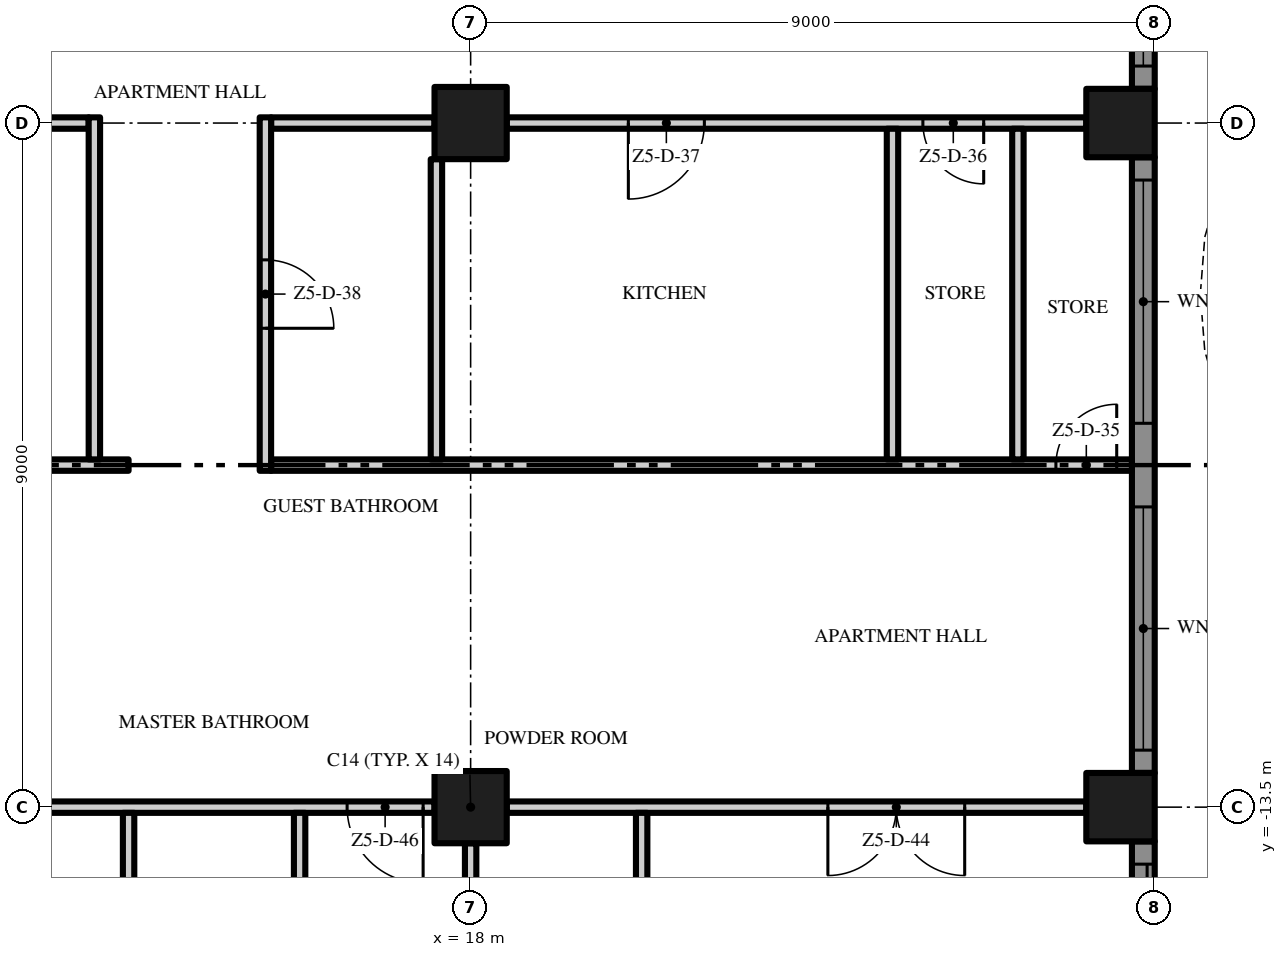
"""IFC4 building model, lengths in metres.
Left out: names, types, materials, properties, quantities, classifications, styles, units other than length and angle.
Written with IfcOpenShell. Run it as: python <this file> out.ifc"""

import sys

from ifc_helpers import new_model, si_unit, direction, frame, frame_2d, origin, origin_2d, place, context, subcontext, project, spatial, polyline, rectangle, outline, extrude, element, fill, save


model = new_model("IFC4")
c1 = context("Model", 3, precision=1e-05, world=origin(), true_north=direction((0.0, 1.0)))
c2 = subcontext(c1, "Body", "Model", "MODEL_VIEW")
j1 = project(units=[si_unit("LENGTHUNIT", "METRE"), si_unit("PLANEANGLEUNIT", "RADIAN")], contexts=[c1])
p1 = place(None, origin())
s1 = spatial("IfcSite", under=j1, at=p1, CompositionType="ELEMENT")
p2 = place(p1, origin())
s2 = spatial("IfcBuilding", under=s1, at=p2, CompositionType="ELEMENT")
p3 = place(p2, frame((0.0, 0.0, 273.0)))
s3 = spatial("IfcBuildingStorey", under=s2, at=p3, CompositionType="ELEMENT", Elevation=273.0)
for number, where, z_axis, x_axis in (
    (1, (18.0, -13.5, 0.0), (0.0, 0.0, 1.0), (1.0, 0.0, 0.0)),
    (2, (18.0, -4.5, 0.0), (0.0, 0.0, 1.0), (1.0, 0.0, 0.0)),
):
    element("IfcColumn", number, at=place(p3, frame(where, z_axis=z_axis, x_axis=x_axis)), inside=s3, PredefinedType="COLUMN", context=c2, shape_type="SweptSolid", body=[
        extrude(rectangle(XDim=0.95, YDim=0.95, at=origin_2d()), origin(), (0.0, 0.0, 1.0), 3.5),
    ])
for number, where, z_axis, x_axis in (
    (3, (26.55, -13.5, 0.0), (0.0, 0.0, 1.0), (1.0, 0.0, 0.0)),
    (4, (26.55, -4.5, 0.0), (0.0, 0.0, 1.0), (1.0, 0.0, 0.0)),
):
    element("IfcColumn", number, at=place(p3, frame(where, z_axis=z_axis, x_axis=x_axis)), inside=s3, PredefinedType="COLUMN", context=c2, shape_type="SweptSolid", body=[
        extrude(rectangle(XDim=0.9, YDim=0.9, at=origin_2d()), origin(), (0.0, 0.0, 1.0), 3.5),
    ])
p4 = place(p3, frame((26.85, -13.95, 0.0), z_axis=(0.0, 0.0, 1.0), x_axis=(0.0, -1.0, 0.0)))
e5 = element("IfcWall", 5, at=p4, inside=s3, PredefinedType="SOLIDWALL", context=c2, shape_type="SweptSolid", body=[
    extrude(rectangle(XDim=3.75, YDim=0.3, at=frame_2d((1.875, 0.0))), origin(), (0.0, 0.0, 1.0), 3.5),
])
p5 = place(p4, frame((0.3, 0.0, 0.0)))
e6 = element("IfcOpeningElement", 6, at=p5, cuts=e5, PredefinedType="OPENING", context=c2, shape_type="SweptSolid", body=[
    extrude(rectangle(XDim=3.15, YDim=2.4, at=frame_2d((1.575, 1.2))), frame((0.0, 0.16, 0.0), z_axis=(0.0, -1.0, 0.0), x_axis=(1.0, 0.0, 0.0)), (0.0, 0.0, 1.0), 0.32),
])
p6 = place(p3, frame((26.85, -4.95, 0.0), z_axis=(0.0, 0.0, 1.0), x_axis=(0.0, -1.0, 0.0)))
e7 = element("IfcWall", 7, at=p6, inside=s3, PredefinedType="SOLIDWALL", context=c2, shape_type="SweptSolid", body=[
    extrude(rectangle(XDim=8.1, YDim=0.3, at=frame_2d((4.05, 0.0))), origin(), (0.0, 0.0, 1.0), 3.5),
])
p7 = place(p6, frame((4.6, 0.0, 0.45)))
e8 = element("IfcOpeningElement", 8, at=p7, cuts=e7, PredefinedType="OPENING", context=c2, shape_type="SweptSolid", body=[
    extrude(rectangle(XDim=3.2, YDim=2.65, at=frame_2d((1.6, 1.325))), frame((0.0, 0.16, 0.0), z_axis=(0.0, -1.0, 0.0), x_axis=(1.0, 0.0, 0.0)), (0.0, 0.0, 1.0), 0.32),
])
p8 = place(p6, frame((0.3, 0.0, 0.45)))
e9 = element("IfcOpeningElement", 9, at=p8, cuts=e7, PredefinedType="OPENING", context=c2, shape_type="SweptSolid", body=[
    extrude(rectangle(XDim=3.2, YDim=2.65, at=frame_2d((1.6, 1.325))), frame((0.0, 0.16, 0.0), z_axis=(0.0, -1.0, 0.0), x_axis=(1.0, 0.0, 0.0)), (0.0, 0.0, 1.0), 0.32),
])
p9 = place(p3, frame((26.85, 4.05, 0.0), z_axis=(0.0, 0.0, 1.0), x_axis=(0.0, -1.0, 0.0)))
e10 = element("IfcWall", 10, at=p9, inside=s3, PredefinedType="SOLIDWALL", context=c2, shape_type="SweptSolid", body=[
    extrude(rectangle(XDim=8.1, YDim=0.3, at=frame_2d((4.05, 0.0))), origin(), (0.0, 0.0, 1.0), 3.5),
])
p10 = place(p9, frame((4.6, 0.0, 0.45)))
e11 = element("IfcOpeningElement", 11, at=p10, cuts=e10, PredefinedType="OPENING", context=c2, shape_type="SweptSolid", body=[
    extrude(rectangle(XDim=3.2, YDim=2.65, at=frame_2d((1.6, 1.325))), frame((0.0, 0.16, 0.0), z_axis=(0.0, -1.0, 0.0), x_axis=(1.0, 0.0, 0.0)), (0.0, 0.0, 1.0), 0.32),
])
p11 = place(p9, frame((0.3, 0.0, 0.0)))
e12 = element("IfcOpeningElement", 12, at=p11, cuts=e10, PredefinedType="OPENING", context=c2, shape_type="SweptSolid", body=[
    extrude(rectangle(XDim=3.2, YDim=2.4, at=frame_2d((1.6, 1.2))), frame((0.0, 0.16, 0.0), z_axis=(0.0, -1.0, 0.0), x_axis=(1.0, 0.0, 0.0)), (0.0, 0.0, 1.0), 0.32),
])
p12 = place(p3, origin())
e13 = element("IfcWall", 13, at=p12, inside=s3, PredefinedType="USERDEFINED", context=c2, shape_type="SweptSolid", body=[
    extrude(outline(polyline([(28.8, -18.0), (29.505, -16.5), (29.941, -15.0), (30.0, -14.25), (29.941, -13.5), (29.505, -12.0), (28.8, -10.5), (28.095, -9.0), (27.659, -7.5), (27.6, -6.75), (27.659, -6.0), (28.095, -4.5), (28.8, -3.0), (29.505, -1.5), (29.941, 0.0), (30.0, 0.75), (29.941, 1.5), (29.505, 3.0), (28.8, 4.5), (28.095, 6.0), (27.659, 7.5), (27.6, 8.25), (27.659, 9.0), (28.095, 10.5), (28.8, 12.0), (29.505, 13.5), (29.941, 15.0), (30.0, 15.75), (29.941, 16.5), (29.505, 18.0), (29.265, 17.93), (29.694, 16.455), (29.749, 15.75), (29.694, 15.045), (29.271, 13.589), (28.574, 12.106), (27.86, 10.589), (27.411, 9.045), (27.349, 8.25), (27.411, 7.455), (27.86, 5.911), (28.574, 4.394), (29.271, 2.911), (29.694, 1.455), (29.749, 0.75), (29.694, 0.045), (29.271, -1.411), (28.574, -2.894), (27.86, -4.411), (27.411, -5.955), (27.349, -6.75), (27.411, -7.545), (27.86, -9.089), (28.574, -10.606), (29.271, -12.089), (29.694, -13.545), (29.749, -14.25), (29.694, -14.955), (29.271, -16.411), (28.574, -17.894), (28.8, -18.0)])), origin(), (0.0, 0.0, 1.0), 0.9),
])
p13 = place(p3, frame((17.525, -13.5, 0.0), z_axis=(0.0, 0.0, 1.0), x_axis=(-1.0, 0.0, 0.0)))
e14 = element("IfcWall", 14, at=p13, inside=s3, PredefinedType="PARTITIONING", context=c2, shape_type="SweptSolid", body=[
    extrude(rectangle(XDim=8.05, YDim=0.15, at=frame_2d((4.025, 0.0))), origin(), (0.0, 0.0, 1.0), 3.5),
])
p14 = place(p13, frame((0.15, 0.0, 0.0)))
e15 = element("IfcOpeningElement", 15, at=p14, cuts=e14, PredefinedType="OPENING", context=c2, shape_type="SweptSolid", body=[
    extrude(rectangle(XDim=1.0, YDim=2.4, at=frame_2d((0.5, 1.2))), frame((0.0, 0.085, 0.0), z_axis=(0.0, -1.0, 0.0), x_axis=(1.0, 0.0, 0.0)), (0.0, 0.0, 1.0), 0.17),
])
p15 = place(p13, frame((6.9, 0.0, 0.0)))
e16 = element("IfcOpeningElement", 16, at=p15, cuts=e14, PredefinedType="OPENING", context=c2, shape_type="SweptSolid", body=[
    extrude(rectangle(XDim=1.0, YDim=2.4, at=frame_2d((0.5, 1.2))), frame((0.0, 0.085, 0.0), z_axis=(0.0, -1.0, 0.0), x_axis=(1.0, 0.0, 0.0)), (0.0, 0.0, 1.0), 0.17),
])
p16 = place(p3, frame((26.1, -13.5, 0.0), z_axis=(0.0, 0.0, 1.0), x_axis=(-1.0, 0.0, 0.0)))
e17 = element("IfcWall", 17, at=p16, inside=s3, PredefinedType="PARTITIONING", context=c2, shape_type="SweptSolid", body=[
    extrude(rectangle(XDim=7.625, YDim=0.15, at=frame_2d((3.812, 0.0))), origin(), (0.0, 0.0, 1.0), 3.5),
])
p17 = place(p16, frame((1.6, 0.0, 0.0)))
e18 = element("IfcOpeningElement", 18, at=p17, cuts=e17, PredefinedType="OPENING", context=c2, shape_type="SweptSolid", body=[
    extrude(rectangle(XDim=1.8, YDim=2.4, at=frame_2d((0.9, 1.2))), frame((0.0, 0.085, 0.0), z_axis=(0.0, -1.0, 0.0), x_axis=(1.0, 0.0, 0.0)), (0.0, 0.0, 1.0), 0.17),
])
p18 = place(p3, frame((0.1, -9.0, 0.0), z_axis=(0.0, 0.0, 1.0), x_axis=(1.0, 0.0, 0.0)))
e19 = element("IfcWall", 19, at=p18, inside=s3, PredefinedType="PARTITIONING", context=c2, shape_type="SweptSolid", body=[
    extrude(rectangle(XDim=13.4, YDim=0.15, at=frame_2d((6.7, 0.0))), origin(), (0.0, 0.0, 1.0), 3.5),
])
p19 = place(p18, frame((11.2, 0.0, 0.0)))
e20 = element("IfcOpeningElement", 20, at=p19, cuts=e19, PredefinedType="OPENING", context=c2, shape_type="SweptSolid", body=[
    extrude(rectangle(XDim=0.8, YDim=2.0, at=frame_2d((0.4, 1.0))), frame((0.0, 0.085, 0.0), z_axis=(0.0, -1.0, 0.0), x_axis=(1.0, 0.0, 0.0)), (0.0, 0.0, 1.0), 0.17),
])
p20 = place(p18, frame((8.55, 0.0, 0.0)))
e21 = element("IfcOpeningElement", 21, at=p20, cuts=e19, PredefinedType="OPENING", context=c2, shape_type="SweptSolid", body=[
    extrude(rectangle(XDim=0.8, YDim=2.0, at=frame_2d((0.4, 1.0))), frame((0.0, 0.085, 0.0), z_axis=(0.0, -1.0, 0.0), x_axis=(1.0, 0.0, 0.0)), (0.0, 0.0, 1.0), 0.17),
])
p21 = place(p18, frame((5.8, 0.0, 0.0)))
e22 = element("IfcOpeningElement", 22, at=p21, cuts=e19, PredefinedType="OPENING", context=c2, shape_type="SweptSolid", body=[
    extrude(rectangle(XDim=0.8, YDim=2.0, at=frame_2d((0.4, 1.0))), frame((0.0, 0.085, 0.0), z_axis=(0.0, -1.0, 0.0), x_axis=(1.0, 0.0, 0.0)), (0.0, 0.0, 1.0), 0.17),
])
p22 = place(p3, frame((15.375, -9.0, 0.0), z_axis=(0.0, 0.0, 1.0), x_axis=(1.0, 0.0, 0.0)))
e23 = element("IfcWall", 23, at=p22, inside=s3, PredefinedType="PARTITIONING", context=c2, shape_type="SweptSolid", body=[
    extrude(rectangle(XDim=11.325, YDim=0.15, at=frame_2d((5.662, 0.0))), origin(), (0.0, 0.0, 1.0), 3.5),
])
p23 = place(p22, frame((10.325, 0.0, 0.0)))
e24 = element("IfcOpeningElement", 24, at=p23, cuts=e23, PredefinedType="OPENING", context=c2, shape_type="SweptSolid", body=[
    extrude(rectangle(XDim=0.8, YDim=2.0, at=frame_2d((0.4, 1.0))), frame((0.0, 0.085, 0.0), z_axis=(0.0, -1.0, 0.0), x_axis=(1.0, 0.0, 0.0)), (0.0, 0.0, 1.0), 0.17),
])
p24 = place(p3, frame((9.475, -4.5, 0.0), z_axis=(0.0, 0.0, 1.0), x_axis=(1.0, 0.0, 0.0)))
e25 = element("IfcWall", 25, at=p24, inside=s3, PredefinedType="PARTITIONING", context=c2, shape_type="SweptSolid", body=[
    extrude(rectangle(XDim=3.5, YDim=0.15, at=frame_2d((1.75, 0.0))), origin(), (0.0, 0.0, 1.0), 3.5),
])
p25 = place(p3, frame((15.375, -4.5, 0.0), z_axis=(0.0, 0.0, 1.0), x_axis=(1.0, 0.0, 0.0)))
e26 = element("IfcWall", 26, at=p25, inside=s3, PredefinedType="PARTITIONING", context=c2, shape_type="SweptSolid", body=[
    extrude(rectangle(XDim=2.15, YDim=0.15, at=frame_2d((1.075, 0.0))), origin(), (0.0, 0.0, 1.0), 3.5),
])
p26 = place(p3, frame((26.1, -4.5, 0.0), z_axis=(0.0, 0.0, 1.0), x_axis=(-1.0, 0.0, 0.0)))
e27 = element("IfcWall", 27, at=p26, inside=s3, PredefinedType="PARTITIONING", context=c2, shape_type="SweptSolid", body=[
    extrude(rectangle(XDim=7.625, YDim=0.15, at=frame_2d((3.812, 0.0))), origin(), (0.0, 0.0, 1.0), 3.5),
])
p27 = place(p26, frame((1.35, 0.0, 0.0)))
e28 = element("IfcOpeningElement", 28, at=p27, cuts=e27, PredefinedType="OPENING", context=c2, shape_type="SweptSolid", body=[
    extrude(rectangle(XDim=0.8, YDim=2.0, at=frame_2d((0.4, 1.0))), frame((0.0, 0.085, 0.0), z_axis=(0.0, -1.0, 0.0), x_axis=(1.0, 0.0, 0.0)), (0.0, 0.0, 1.0), 0.17),
])
p28 = place(p26, frame((5.025, 0.0, 0.0)))
e29 = element("IfcOpeningElement", 29, at=p28, cuts=e27, PredefinedType="OPENING", context=c2, shape_type="SweptSolid", body=[
    extrude(rectangle(XDim=1.0, YDim=2.4, at=frame_2d((0.5, 1.2))), frame((0.0, 0.085, 0.0), z_axis=(0.0, -1.0, 0.0), x_axis=(1.0, 0.0, 0.0)), (0.0, 0.0, 1.0), 0.17),
])
p29 = place(p3, frame((13.05, -8.925, 0.0), z_axis=(0.0, 0.0, 1.0), x_axis=(0.0, 1.0, 0.0)))
e30 = element("IfcWall", 30, at=p29, inside=s3, PredefinedType="PARTITIONING", context=c2, shape_type="SweptSolid", body=[
    extrude(rectangle(XDim=4.5, YDim=0.15, at=frame_2d((2.25, 0.0))), origin(), (0.0, 0.0, 1.0), 3.5),
])
p30 = place(p3, frame((13.5, -22.2, 0.0), z_axis=(0.0, 0.0, 1.0), x_axis=(0.0, 1.0, 0.0)))
e31 = element("IfcWall", 31, at=p30, inside=s3, PredefinedType="PARTITIONING", context=c2, shape_type="SweptSolid", body=[
    extrude(rectangle(XDim=8.625, YDim=0.15, at=frame_2d((4.312, 0.0))), origin(), (0.0, 0.0, 1.0), 3.5),
])
p31 = place(p3, frame((15.3, -4.425, 0.0), z_axis=(0.0, 0.0, 1.0), x_axis=(0.0, -1.0, 0.0)))
e32 = element("IfcWall", 32, at=p31, inside=s3, PredefinedType="PARTITIONING", context=c2, shape_type="SweptSolid", body=[
    extrude(rectangle(XDim=4.65, YDim=0.15, at=frame_2d((2.325, 0.0))), origin(), (0.0, 0.0, 1.0), 3.5),
])
p32 = place(p31, frame((1.875, 0.0, 0.0)))
e33 = element("IfcOpeningElement", 33, at=p32, cuts=e32, PredefinedType="OPENING", context=c2, shape_type="SweptSolid", body=[
    extrude(rectangle(XDim=0.9, YDim=2.1, at=frame_2d((0.45, 1.05))), frame((0.0, 0.085, 0.0), z_axis=(0.0, -1.0, 0.0), x_axis=(1.0, 0.0, 0.0)), (0.0, 0.0, 1.0), 0.17),
])
p33 = place(p3, frame((15.75, -16.575, 0.0), z_axis=(0.0, 0.0, 1.0), x_axis=(0.0, 1.0, 0.0)))
e34 = element("IfcWall", 34, at=p33, inside=s3, PredefinedType="PARTITIONING", context=c2, shape_type="SweptSolid", body=[
    extrude(rectangle(XDim=3.0, YDim=0.15, at=frame_2d((1.5, 0.0))), origin(), (0.0, 0.0, 1.0), 3.5),
])
p34 = place(p3, frame((17.55, -8.925, 0.0), z_axis=(0.0, 0.0, 1.0), x_axis=(0.0, 1.0, 0.0)))
e35 = element("IfcWall", 35, at=p34, inside=s3, PredefinedType="PARTITIONING", context=c2, shape_type="SweptSolid", body=[
    extrude(rectangle(XDim=3.95, YDim=0.15, at=frame_2d((1.975, 0.0))), origin(), (0.0, 0.0, 1.0), 3.5),
])
p35 = place(p3, frame((18.0, -21.6, 0.0), z_axis=(0.0, 0.0, 1.0), x_axis=(0.0, 1.0, 0.0)))
e36 = element("IfcWall", 36, at=p35, inside=s3, PredefinedType="PARTITIONING", context=c2, shape_type="SweptSolid", body=[
    extrude(rectangle(XDim=7.625, YDim=0.15, at=frame_2d((3.812, 0.0))), origin(), (0.0, 0.0, 1.0), 3.5),
])
p36 = place(p3, frame((20.25, -16.575, 0.0), z_axis=(0.0, 0.0, 1.0), x_axis=(0.0, 1.0, 0.0)))
e37 = element("IfcWall", 37, at=p36, inside=s3, PredefinedType="PARTITIONING", context=c2, shape_type="SweptSolid", body=[
    extrude(rectangle(XDim=3.0, YDim=0.15, at=frame_2d((1.5, 0.0))), origin(), (0.0, 0.0, 1.0), 3.5),
])
for number, where, z_axis, x_axis in (
    (38, (23.55, -8.925, 0.0), (0.0, 0.0, 1.0), (0.0, 1.0, 0.0)),
    (39, (25.2, -8.925, 0.0), (0.0, 0.0, 1.0), (0.0, 1.0, 0.0)),
):
    element("IfcWall", number, at=place(p3, frame(where, z_axis=z_axis, x_axis=x_axis)), inside=s3, PredefinedType="PARTITIONING", context=c2, shape_type="SweptSolid", body=[
        extrude(rectangle(XDim=4.35, YDim=0.15, at=frame_2d((2.175, 0.0))), origin(), (0.0, 0.0, 1.0), 3.5),
    ])
p37 = place(p5, origin())
e40 = element("IfcDoor", 40, at=p37, inside=s3, OperationType="SINGLE_SWING_LEFT", PredefinedType="DOOR", context=c2, shape_type="SweptSolid", body=[
    extrude(rectangle(XDim=3.15, YDim=2.4, at=frame_2d((1.575, 1.2))), frame((0.0, 0.025, 0.0), z_axis=(0.0, -1.0, 0.0), x_axis=(1.0, 0.0, 0.0)), (0.0, 0.0, 1.0), 0.05),
])
fill(e6, e40)
p38 = place(p7, origin())
e41 = element("IfcWindow", 41, at=p38, inside=s3, PartitioningType="SINGLE_PANEL", PredefinedType="WINDOW", context=c2, shape_type="SweptSolid", body=[
    extrude(rectangle(XDim=3.2, YDim=2.65, at=frame_2d((1.6, 1.325))), frame((0.0, 0.03, 0.0), z_axis=(0.0, -1.0, 0.0), x_axis=(1.0, 0.0, 0.0)), (0.0, 0.0, 1.0), 0.06),
])
fill(e8, e41)
p39 = place(p8, origin())
e42 = element("IfcWindow", 42, at=p39, inside=s3, PartitioningType="SINGLE_PANEL", PredefinedType="WINDOW", context=c2, shape_type="SweptSolid", body=[
    extrude(rectangle(XDim=3.2, YDim=2.65, at=frame_2d((1.6, 1.325))), frame((0.0, 0.03, 0.0), z_axis=(0.0, -1.0, 0.0), x_axis=(1.0, 0.0, 0.0)), (0.0, 0.0, 1.0), 0.06),
])
fill(e9, e42)
p40 = place(p10, origin())
e43 = element("IfcWindow", 43, at=p40, inside=s3, PartitioningType="SINGLE_PANEL", PredefinedType="WINDOW", context=c2, shape_type="SweptSolid", body=[
    extrude(rectangle(XDim=3.2, YDim=2.65, at=frame_2d((1.6, 1.325))), frame((0.0, 0.03, 0.0), z_axis=(0.0, -1.0, 0.0), x_axis=(1.0, 0.0, 0.0)), (0.0, 0.0, 1.0), 0.06),
])
fill(e11, e43)
p41 = place(p23, origin())
e44 = element("IfcDoor", 44, at=p41, inside=s3, OperationType="SINGLE_SWING_RIGHT", PredefinedType="DOOR", context=c2, shape_type="SweptSolid", body=[
    extrude(rectangle(XDim=0.8, YDim=2.0, at=frame_2d((0.4, 1.0))), frame((0.0, 0.025, 0.0), z_axis=(0.0, -1.0, 0.0), x_axis=(1.0, 0.0, 0.0)), (0.0, 0.0, 1.0), 0.05),
])
fill(e24, e44)
p42 = place(p27, origin())
e45 = element("IfcDoor", 45, at=p42, inside=s3, OperationType="SINGLE_SWING_LEFT", PredefinedType="DOOR", context=c2, shape_type="SweptSolid", body=[
    extrude(rectangle(XDim=0.8, YDim=2.0, at=frame_2d((0.4, 1.0))), frame((0.0, 0.025, 0.0), z_axis=(0.0, -1.0, 0.0), x_axis=(1.0, 0.0, 0.0)), (0.0, 0.0, 1.0), 0.05),
])
fill(e28, e45)
p43 = place(p28, origin())
e46 = element("IfcDoor", 46, at=p43, inside=s3, OperationType="SINGLE_SWING_RIGHT", PredefinedType="DOOR", context=c2, shape_type="SweptSolid", body=[
    extrude(rectangle(XDim=1.0, YDim=2.4, at=frame_2d((0.5, 1.2))), frame((0.0, 0.025, 0.0), z_axis=(0.0, -1.0, 0.0), x_axis=(1.0, 0.0, 0.0)), (0.0, 0.0, 1.0), 0.05),
])
fill(e29, e46)
p44 = place(p32, origin())
e47 = element("IfcDoor", 47, at=p44, inside=s3, OperationType="SINGLE_SWING_RIGHT", PredefinedType="DOOR", context=c2, shape_type="SweptSolid", body=[
    extrude(rectangle(XDim=0.9, YDim=2.1, at=frame_2d((0.45, 1.05))), frame((0.0, 0.025, 0.0), z_axis=(0.0, -1.0, 0.0), x_axis=(1.0, 0.0, 0.0)), (0.0, 0.0, 1.0), 0.05),
])
fill(e33, e47)
p45 = place(p17, origin())
e48 = element("IfcDoor", 48, at=p45, inside=s3, OperationType="DOUBLE_DOOR_SINGLE_SWING", PredefinedType="DOOR", context=c2, shape_type="SweptSolid", body=[
    extrude(rectangle(XDim=1.8, YDim=2.4, at=frame_2d((0.9, 1.2))), frame((0.0, 0.025, 0.0), z_axis=(0.0, -1.0, 0.0), x_axis=(1.0, 0.0, 0.0)), (0.0, 0.0, 1.0), 0.05),
])
fill(e18, e48)
p46 = place(p14, origin())
e49 = element("IfcDoor", 49, at=p46, inside=s3, OperationType="SINGLE_SWING_LEFT", PredefinedType="DOOR", context=c2, shape_type="SweptSolid", body=[
    extrude(rectangle(XDim=1.0, YDim=2.4, at=frame_2d((0.5, 1.2))), frame((0.0, 0.025, 0.0), z_axis=(0.0, -1.0, 0.0), x_axis=(1.0, 0.0, 0.0)), (0.0, 0.0, 1.0), 0.05),
])
fill(e15, e49)
save(model, sys.argv[1])
